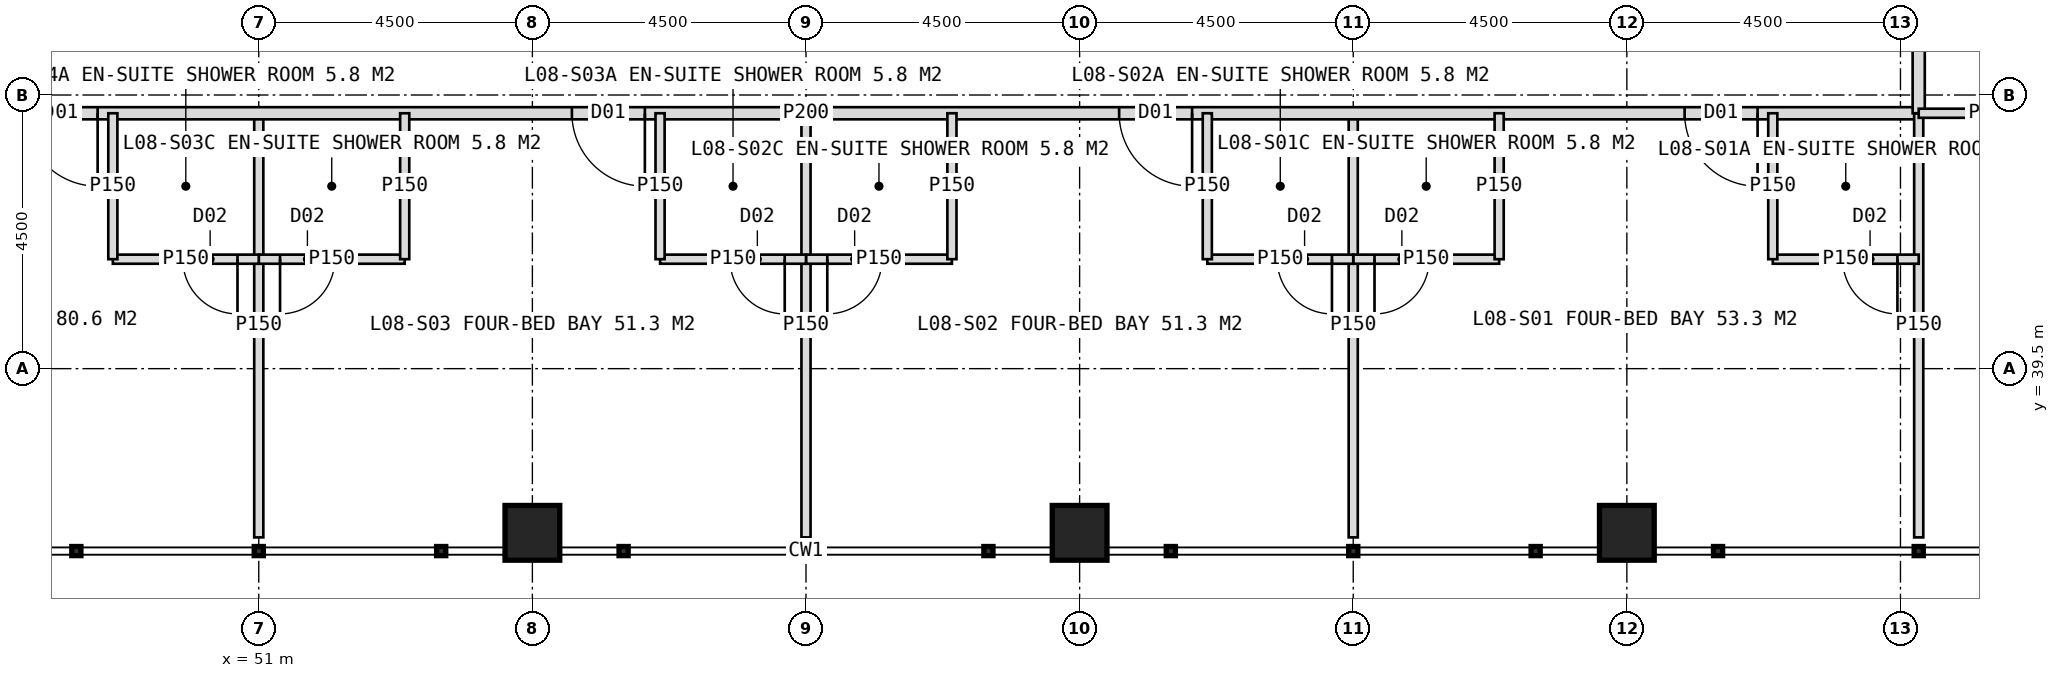
"""IFC4 building model, lengths in metres.
Left out: names, types, materials, properties, quantities, classifications, styles, units other than length and angle.
Written with IfcOpenShell. Run it as: python <this file> out.ifc"""

import sys

from ifc_helpers import new_model, si_unit, direction, frame, frame_2d, origin, origin_2d, place, context, subcontext, project, spatial, rectangle, hollow_rectangle, extrude, element, fill, save


model = new_model("IFC4")
c1 = context("Model", 3, precision=1e-05, world=origin(), true_north=direction((0.0, 1.0)))
c2 = subcontext(c1, "Body", "Model", "MODEL_VIEW")
j1 = project(units=[si_unit("LENGTHUNIT", "METRE"), si_unit("PLANEANGLEUNIT", "RADIAN")], contexts=[c1])
p1 = place(None, origin())
s1 = spatial("IfcSite", under=j1, at=p1, CompositionType="ELEMENT")
p2 = place(p1, origin())
s2 = spatial("IfcBuilding", under=s1, at=p2, CompositionType="ELEMENT")
p3 = place(p2, frame((0.0, 0.0, 39.0)))
s3 = spatial("IfcBuildingStorey", under=s2, at=p3, CompositionType="ELEMENT", Elevation=39.0)
for number, where, z_axis, x_axis in (
    (1, (55.5, 36.8, 0.0), (0.0, 0.0, 1.0), (1.0, 0.0, 0.0)),
    (2, (64.5, 36.8, 0.0), (0.0, 0.0, 1.0), (1.0, 0.0, 0.0)),
    (3, (73.5, 36.8, 0.0), (0.0, 0.0, 1.0), (1.0, 0.0, 0.0)),
):
    element("IfcColumn", number, at=place(p3, frame(where, z_axis=z_axis, x_axis=x_axis)), inside=s3, PredefinedType="COLUMN", context=c2, shape_type="SweptSolid", body=[
        extrude(hollow_rectangle(XDim=0.9, YDim=0.9, WallThickness=0.08, at=origin_2d()), origin(), (0.0, 0.0, 1.0), 4.0),
    ])
p4 = place(p3, frame((69.0, 43.7, 0.0), z_axis=(0.0, 0.0, 1.0), x_axis=(0.0, -1.0, 0.0)))
e4 = element("IfcWall", 4, at=p4, inside=s3, PredefinedType="PARTITIONING", context=c2, shape_type="SweptSolid", body=[
    extrude(rectangle(XDim=6.975, YDim=0.15, at=frame_2d((3.487, 0.0))), origin(), (0.0, 0.0, 1.0), 3.75),
])
p5 = place(p3, frame((60.0, 43.7, 0.0), z_axis=(0.0, 0.0, 1.0), x_axis=(0.0, -1.0, 0.0)))
e5 = element("IfcWall", 5, at=p5, inside=s3, PredefinedType="PARTITIONING", context=c2, shape_type="SweptSolid", body=[
    extrude(rectangle(XDim=6.975, YDim=0.15, at=frame_2d((3.487, 0.0))), origin(), (0.0, 0.0, 1.0), 2.75),
])
p6 = place(p3, frame((51.0, 43.7, 0.0), z_axis=(0.0, 0.0, 1.0), x_axis=(0.0, -1.0, 0.0)))
e6 = element("IfcWall", 6, at=p6, inside=s3, PredefinedType="PARTITIONING", context=c2, shape_type="SweptSolid", body=[
    extrude(rectangle(XDim=6.975, YDim=0.15, at=frame_2d((3.487, 0.0))), origin(), (0.0, 0.0, 1.0), 3.75),
])
p7 = place(p3, frame((78.3, 43.7, 0.0), z_axis=(0.0, 0.0, 1.0), x_axis=(-1.0, 0.0, 0.0)))
e7 = element("IfcWall", 7, at=p7, inside=s3, PredefinedType="PARTITIONING", context=c2, shape_type="SweptSolid", body=[
    extrude(rectangle(XDim=36.6, YDim=0.2, at=frame_2d((18.3, 0.0))), origin(), (0.0, 0.0, 1.0), 3.75),
])
p8 = place(p7, frame((2.65, 0.0, 0.0)))
e8 = element("IfcOpeningElement", 8, at=p8, cuts=e7, PredefinedType="OPENING", context=c2, shape_type="SweptSolid", body=[
    extrude(rectangle(XDim=1.2, YDim=2.2, at=frame_2d((0.6, 1.1))), frame((0.0, 0.11, 0.0), z_axis=(0.0, -1.0, 0.0), x_axis=(1.0, 0.0, 0.0)), (0.0, 0.0, 1.0), 0.22),
])
p9 = place(p7, frame((11.95, 0.0, 0.0)))
e9 = element("IfcOpeningElement", 9, at=p9, cuts=e7, PredefinedType="OPENING", context=c2, shape_type="SweptSolid", body=[
    extrude(rectangle(XDim=1.2, YDim=2.2, at=frame_2d((0.6, 1.1))), frame((0.0, 0.11, 0.0), z_axis=(0.0, -1.0, 0.0), x_axis=(1.0, 0.0, 0.0)), (0.0, 0.0, 1.0), 0.22),
])
p10 = place(p7, frame((20.95, 0.0, 0.0)))
e10 = element("IfcOpeningElement", 10, at=p10, cuts=e7, PredefinedType="OPENING", context=c2, shape_type="SweptSolid", body=[
    extrude(rectangle(XDim=1.2, YDim=2.2, at=frame_2d((0.6, 1.1))), frame((0.0, 0.11, 0.0), z_axis=(0.0, -1.0, 0.0), x_axis=(1.0, 0.0, 0.0)), (0.0, 0.0, 1.0), 0.22),
])
p11 = place(p7, frame((29.95, 0.0, 0.0)))
e11 = element("IfcOpeningElement", 11, at=p11, cuts=e7, PredefinedType="OPENING", context=c2, shape_type="SweptSolid", body=[
    extrude(rectangle(XDim=1.2, YDim=2.2, at=frame_2d((0.6, 1.1))), frame((0.0, 0.11, 0.0), z_axis=(0.0, -1.0, 0.0), x_axis=(1.0, 0.0, 0.0)), (0.0, 0.0, 1.0), 0.22),
])
p12 = place(p3, frame((78.3, 43.7, 0.0), z_axis=(0.0, 0.0, 1.0), x_axis=(0.0, -1.0, 0.0)))
e12 = element("IfcWall", 12, at=p12, inside=s3, PredefinedType="PARTITIONING", context=c2, shape_type="SweptSolid", body=[
    extrude(rectangle(XDim=6.975, YDim=0.15, at=frame_2d((3.487, 0.0))), origin(), (0.0, 0.0, 1.0), 3.75),
])
p13 = place(p3, frame((78.3, 41.3, 0.0), z_axis=(0.0, 0.0, 1.0), x_axis=(-1.0, 0.0, 0.0)))
e13 = element("IfcWall", 13, at=p13, inside=s3, PredefinedType="PARTITIONING", context=c2, shape_type="SweptSolid", body=[
    extrude(rectangle(XDim=2.4, YDim=0.15, at=frame_2d((1.2, 0.0))), origin(), (0.0, 0.0, 1.0), 2.95),
])
p14 = place(p13, frame((0.35, 0.0, 0.0)))
e14 = element("IfcOpeningElement", 14, at=p14, cuts=e13, PredefinedType="OPENING", context=c2, shape_type="SweptSolid", body=[
    extrude(rectangle(XDim=0.9, YDim=2.1, at=frame_2d((0.45, 1.05))), frame((0.0, 0.085, 0.0), z_axis=(0.0, -1.0, 0.0), x_axis=(1.0, 0.0, 0.0)), (0.0, 0.0, 1.0), 0.17),
])
p15 = place(p3, frame((75.9, 43.7, 0.0), z_axis=(0.0, 0.0, 1.0), x_axis=(0.0, -1.0, 0.0)))
e15 = element("IfcWall", 15, at=p15, inside=s3, PredefinedType="PARTITIONING", context=c2, shape_type="SweptSolid", body=[
    extrude(rectangle(XDim=2.4, YDim=0.15, at=frame_2d((1.2, 0.0))), origin(), (0.0, 0.0, 1.0), 3.75),
])
p16 = place(p3, frame((71.4, 41.3, 0.0), z_axis=(0.0, 0.0, 1.0), x_axis=(-1.0, 0.0, 0.0)))
e16 = element("IfcWall", 16, at=p16, inside=s3, PredefinedType="PARTITIONING", context=c2, shape_type="SweptSolid", body=[
    extrude(rectangle(XDim=2.4, YDim=0.15, at=frame_2d((1.2, 0.0))), origin(), (0.0, 0.0, 1.0), 3.75),
])
p17 = place(p16, frame((1.15, 0.0, 0.0)))
e17 = element("IfcOpeningElement", 17, at=p17, cuts=e16, PredefinedType="OPENING", context=c2, shape_type="SweptSolid", body=[
    extrude(rectangle(XDim=0.9, YDim=2.1, at=frame_2d((0.45, 1.05))), frame((0.0, 0.085, 0.0), z_axis=(0.0, -1.0, 0.0), x_axis=(1.0, 0.0, 0.0)), (0.0, 0.0, 1.0), 0.17),
])
p18 = place(p3, frame((71.4, 43.7, 0.0), z_axis=(0.0, 0.0, 1.0), x_axis=(0.0, -1.0, 0.0)))
e18 = element("IfcWall", 18, at=p18, inside=s3, PredefinedType="PARTITIONING", context=c2, shape_type="SweptSolid", body=[
    extrude(rectangle(XDim=2.4, YDim=0.15, at=frame_2d((1.2, 0.0))), origin(), (0.0, 0.0, 1.0), 3.75),
])
p19 = place(p3, frame((69.0, 41.3, 0.0), z_axis=(0.0, 0.0, 1.0), x_axis=(-1.0, 0.0, 0.0)))
e19 = element("IfcWall", 19, at=p19, inside=s3, PredefinedType="PARTITIONING", context=c2, shape_type="SweptSolid", body=[
    extrude(rectangle(XDim=2.4, YDim=0.15, at=frame_2d((1.2, 0.0))), origin(), (0.0, 0.0, 1.0), 3.75),
])
p20 = place(p19, frame((0.35, 0.0, 0.0)))
e20 = element("IfcOpeningElement", 20, at=p20, cuts=e19, PredefinedType="OPENING", context=c2, shape_type="SweptSolid", body=[
    extrude(rectangle(XDim=0.9, YDim=2.1, at=frame_2d((0.45, 1.05))), frame((0.0, 0.085, 0.0), z_axis=(0.0, -1.0, 0.0), x_axis=(1.0, 0.0, 0.0)), (0.0, 0.0, 1.0), 0.17),
])
p21 = place(p3, frame((66.6, 43.7, 0.0), z_axis=(0.0, 0.0, 1.0), x_axis=(0.0, -1.0, 0.0)))
e21 = element("IfcWall", 21, at=p21, inside=s3, PredefinedType="PARTITIONING", context=c2, shape_type="SweptSolid", body=[
    extrude(rectangle(XDim=2.4, YDim=0.15, at=frame_2d((1.2, 0.0))), origin(), (0.0, 0.0, 1.0), 3.75),
])
p22 = place(p3, frame((62.4, 41.3, 0.0), z_axis=(0.0, 0.0, 1.0), x_axis=(-1.0, 0.0, 0.0)))
e22 = element("IfcWall", 22, at=p22, inside=s3, PredefinedType="PARTITIONING", context=c2, shape_type="SweptSolid", body=[
    extrude(rectangle(XDim=2.4, YDim=0.15, at=frame_2d((1.2, 0.0))), origin(), (0.0, 0.0, 1.0), 3.75),
])
p23 = place(p22, frame((1.15, 0.0, 0.0)))
e23 = element("IfcOpeningElement", 23, at=p23, cuts=e22, PredefinedType="OPENING", context=c2, shape_type="SweptSolid", body=[
    extrude(rectangle(XDim=0.9, YDim=2.1, at=frame_2d((0.45, 1.05))), frame((0.0, 0.085, 0.0), z_axis=(0.0, -1.0, 0.0), x_axis=(1.0, 0.0, 0.0)), (0.0, 0.0, 1.0), 0.17),
])
p24 = place(p3, frame((62.4, 43.7, 0.0), z_axis=(0.0, 0.0, 1.0), x_axis=(0.0, -1.0, 0.0)))
e24 = element("IfcWall", 24, at=p24, inside=s3, PredefinedType="PARTITIONING", context=c2, shape_type="SweptSolid", body=[
    extrude(rectangle(XDim=2.4, YDim=0.15, at=frame_2d((1.2, 0.0))), origin(), (0.0, 0.0, 1.0), 3.75),
])
p25 = place(p3, frame((60.0, 41.3, 0.0), z_axis=(0.0, 0.0, 1.0), x_axis=(-1.0, 0.0, 0.0)))
e25 = element("IfcWall", 25, at=p25, inside=s3, PredefinedType="PARTITIONING", context=c2, shape_type="SweptSolid", body=[
    extrude(rectangle(XDim=2.4, YDim=0.15, at=frame_2d((1.2, 0.0))), origin(), (0.0, 0.0, 1.0), 3.75),
])
p26 = place(p25, frame((0.35, 0.0, 0.0)))
e26 = element("IfcOpeningElement", 26, at=p26, cuts=e25, PredefinedType="OPENING", context=c2, shape_type="SweptSolid", body=[
    extrude(rectangle(XDim=0.9, YDim=2.1, at=frame_2d((0.45, 1.05))), frame((0.0, 0.085, 0.0), z_axis=(0.0, -1.0, 0.0), x_axis=(1.0, 0.0, 0.0)), (0.0, 0.0, 1.0), 0.17),
])
p27 = place(p3, frame((57.6, 43.7, 0.0), z_axis=(0.0, 0.0, 1.0), x_axis=(0.0, -1.0, 0.0)))
e27 = element("IfcWall", 27, at=p27, inside=s3, PredefinedType="PARTITIONING", context=c2, shape_type="SweptSolid", body=[
    extrude(rectangle(XDim=2.4, YDim=0.15, at=frame_2d((1.2, 0.0))), origin(), (0.0, 0.0, 1.0), 3.75),
])
p28 = place(p3, frame((53.4, 41.3, 0.0), z_axis=(0.0, 0.0, 1.0), x_axis=(-1.0, 0.0, 0.0)))
e28 = element("IfcWall", 28, at=p28, inside=s3, PredefinedType="PARTITIONING", context=c2, shape_type="SweptSolid", body=[
    extrude(rectangle(XDim=2.4, YDim=0.15, at=frame_2d((1.2, 0.0))), origin(), (0.0, 0.0, 1.0), 3.75),
])
p29 = place(p28, frame((1.15, 0.0, 0.0)))
e29 = element("IfcOpeningElement", 29, at=p29, cuts=e28, PredefinedType="OPENING", context=c2, shape_type="SweptSolid", body=[
    extrude(rectangle(XDim=0.9, YDim=2.1, at=frame_2d((0.45, 1.05))), frame((0.0, 0.085, 0.0), z_axis=(0.0, -1.0, 0.0), x_axis=(1.0, 0.0, 0.0)), (0.0, 0.0, 1.0), 0.17),
])
p30 = place(p3, frame((53.4, 43.7, 0.0), z_axis=(0.0, 0.0, 1.0), x_axis=(0.0, -1.0, 0.0)))
e30 = element("IfcWall", 30, at=p30, inside=s3, PredefinedType="PARTITIONING", context=c2, shape_type="SweptSolid", body=[
    extrude(rectangle(XDim=2.4, YDim=0.15, at=frame_2d((1.2, 0.0))), origin(), (0.0, 0.0, 1.0), 3.75),
])
p31 = place(p3, frame((51.0, 41.3, 0.0), z_axis=(0.0, 0.0, 1.0), x_axis=(-1.0, 0.0, 0.0)))
e31 = element("IfcWall", 31, at=p31, inside=s3, PredefinedType="PARTITIONING", context=c2, shape_type="SweptSolid", body=[
    extrude(rectangle(XDim=2.4, YDim=0.15, at=frame_2d((1.2, 0.0))), origin(), (0.0, 0.0, 1.0), 3.75),
])
p32 = place(p31, frame((0.35, 0.0, 0.0)))
e32 = element("IfcOpeningElement", 32, at=p32, cuts=e31, PredefinedType="OPENING", context=c2, shape_type="SweptSolid", body=[
    extrude(rectangle(XDim=0.9, YDim=2.1, at=frame_2d((0.45, 1.05))), frame((0.0, 0.085, 0.0), z_axis=(0.0, -1.0, 0.0), x_axis=(1.0, 0.0, 0.0)), (0.0, 0.0, 1.0), 0.17),
])
p33 = place(p3, frame((48.6, 43.7, 0.0), z_axis=(0.0, 0.0, 1.0), x_axis=(0.0, -1.0, 0.0)))
e33 = element("IfcWall", 33, at=p33, inside=s3, PredefinedType="PARTITIONING", context=c2, shape_type="SweptSolid", body=[
    extrude(rectangle(XDim=2.4, YDim=0.15, at=frame_2d((1.2, 0.0))), origin(), (0.0, 0.0, 1.0), 3.75),
])
p34 = place(p3, frame((78.3, 80.3, 0.0), z_axis=(0.0, 0.0, 1.0), x_axis=(0.0, -1.0, 0.0)))
e34 = element("IfcWall", 34, at=p34, inside=s3, PredefinedType="PARTITIONING", context=c2, shape_type="SweptSolid", body=[
    extrude(rectangle(XDim=36.6, YDim=0.2, at=frame_2d((18.3, 0.0))), origin(), (0.0, 0.0, 1.0), 3.75),
])
p35 = place(p34, frame((2.65, 0.0, 0.0)))
e35 = element("IfcOpeningElement", 35, at=p35, cuts=e34, PredefinedType="OPENING", context=c2, shape_type="SweptSolid", body=[
    extrude(rectangle(XDim=1.2, YDim=2.2, at=frame_2d((0.6, 1.1))), frame((0.0, 0.11, 0.0), z_axis=(0.0, -1.0, 0.0), x_axis=(1.0, 0.0, 0.0)), (0.0, 0.0, 1.0), 0.22),
])
p36 = place(p34, frame((11.95, 0.0, 0.0)))
e36 = element("IfcOpeningElement", 36, at=p36, cuts=e34, PredefinedType="OPENING", context=c2, shape_type="SweptSolid", body=[
    extrude(rectangle(XDim=1.2, YDim=2.2, at=frame_2d((0.6, 1.1))), frame((0.0, 0.11, 0.0), z_axis=(0.0, -1.0, 0.0), x_axis=(1.0, 0.0, 0.0)), (0.0, 0.0, 1.0), 0.22),
])
p37 = place(p34, frame((20.95, 0.0, 0.0)))
e37 = element("IfcOpeningElement", 37, at=p37, cuts=e34, PredefinedType="OPENING", context=c2, shape_type="SweptSolid", body=[
    extrude(rectangle(XDim=1.2, YDim=2.2, at=frame_2d((0.6, 1.1))), frame((0.0, 0.11, 0.0), z_axis=(0.0, -1.0, 0.0), x_axis=(1.0, 0.0, 0.0)), (0.0, 0.0, 1.0), 0.22),
])
p38 = place(p34, frame((29.95, 0.0, 0.0)))
e38 = element("IfcOpeningElement", 38, at=p38, cuts=e34, PredefinedType="OPENING", context=c2, shape_type="SweptSolid", body=[
    extrude(rectangle(XDim=1.2, YDim=2.2, at=frame_2d((0.6, 1.1))), frame((0.0, 0.11, 0.0), z_axis=(0.0, -1.0, 0.0), x_axis=(1.0, 0.0, 0.0)), (0.0, 0.0, 1.0), 0.22),
])
p39 = place(p3, frame((78.3, 43.7, 0.0), z_axis=(0.0, 0.0, 1.0), x_axis=(1.0, 0.0, 0.0)))
e39 = element("IfcWall", 39, at=p39, inside=s3, PredefinedType="PARTITIONING", context=c2, shape_type="SweptSolid", body=[
    extrude(rectangle(XDim=2.4, YDim=0.15, at=frame_2d((1.2, 0.0))), origin(), (0.0, 0.0, 1.0), 3.75),
])
p40 = place(p8, origin())
e40 = element("IfcDoor", 40, at=p40, inside=s3, OperationType="SINGLE_SWING_LEFT", PredefinedType="DOOR", context=c2, shape_type="SweptSolid", body=[
    extrude(rectangle(XDim=1.2, YDim=2.2, at=frame_2d((0.6, 1.1))), frame((0.0, 0.025, 0.0), z_axis=(0.0, -1.0, 0.0), x_axis=(1.0, 0.0, 0.0)), (0.0, 0.0, 1.0), 0.05),
])
fill(e8, e40)
p41 = place(p14, origin())
e41 = element("IfcDoor", 41, at=p41, inside=s3, OperationType="SINGLE_SWING_LEFT", PredefinedType="DOOR", context=c2, shape_type="SweptSolid", body=[
    extrude(rectangle(XDim=0.9, YDim=2.1, at=frame_2d((0.45, 1.05))), frame((0.0, 0.025, 0.0), z_axis=(0.0, -1.0, 0.0), x_axis=(1.0, 0.0, 0.0)), (0.0, 0.0, 1.0), 0.05),
])
fill(e14, e41)
p42 = place(p17, origin())
e42 = element("IfcDoor", 42, at=p42, inside=s3, OperationType="SINGLE_SWING_RIGHT", PredefinedType="DOOR", context=c2, shape_type="SweptSolid", body=[
    extrude(rectangle(XDim=0.9, YDim=2.1, at=frame_2d((0.45, 1.05))), frame((0.0, 0.025, 0.0), z_axis=(0.0, -1.0, 0.0), x_axis=(1.0, 0.0, 0.0)), (0.0, 0.0, 1.0), 0.05),
])
fill(e17, e42)
p43 = place(p9, origin())
e43 = element("IfcDoor", 43, at=p43, inside=s3, OperationType="SINGLE_SWING_LEFT", PredefinedType="DOOR", context=c2, shape_type="SweptSolid", body=[
    extrude(rectangle(XDim=1.2, YDim=2.2, at=frame_2d((0.6, 1.1))), frame((0.0, 0.025, 0.0), z_axis=(0.0, -1.0, 0.0), x_axis=(1.0, 0.0, 0.0)), (0.0, 0.0, 1.0), 0.05),
])
fill(e9, e43)
p44 = place(p20, origin())
e44 = element("IfcDoor", 44, at=p44, inside=s3, OperationType="SINGLE_SWING_LEFT", PredefinedType="DOOR", context=c2, shape_type="SweptSolid", body=[
    extrude(rectangle(XDim=0.9, YDim=2.1, at=frame_2d((0.45, 1.05))), frame((0.0, 0.025, 0.0), z_axis=(0.0, -1.0, 0.0), x_axis=(1.0, 0.0, 0.0)), (0.0, 0.0, 1.0), 0.05),
])
fill(e20, e44)
p45 = place(p23, origin())
e45 = element("IfcDoor", 45, at=p45, inside=s3, OperationType="SINGLE_SWING_RIGHT", PredefinedType="DOOR", context=c2, shape_type="SweptSolid", body=[
    extrude(rectangle(XDim=0.9, YDim=2.1, at=frame_2d((0.45, 1.05))), frame((0.0, 0.025, 0.0), z_axis=(0.0, -1.0, 0.0), x_axis=(1.0, 0.0, 0.0)), (0.0, 0.0, 1.0), 0.05),
])
fill(e23, e45)
p46 = place(p10, origin())
e46 = element("IfcDoor", 46, at=p46, inside=s3, OperationType="SINGLE_SWING_LEFT", PredefinedType="DOOR", context=c2, shape_type="SweptSolid", body=[
    extrude(rectangle(XDim=1.2, YDim=2.2, at=frame_2d((0.6, 1.1))), frame((0.0, 0.025, 0.0), z_axis=(0.0, -1.0, 0.0), x_axis=(1.0, 0.0, 0.0)), (0.0, 0.0, 1.0), 0.05),
])
fill(e10, e46)
p47 = place(p26, origin())
e47 = element("IfcDoor", 47, at=p47, inside=s3, OperationType="SINGLE_SWING_LEFT", PredefinedType="DOOR", context=c2, shape_type="SweptSolid", body=[
    extrude(rectangle(XDim=0.9, YDim=2.1, at=frame_2d((0.45, 1.05))), frame((0.0, 0.025, 0.0), z_axis=(0.0, -1.0, 0.0), x_axis=(1.0, 0.0, 0.0)), (0.0, 0.0, 1.0), 0.05),
])
fill(e26, e47)
p48 = place(p29, origin())
e48 = element("IfcDoor", 48, at=p48, inside=s3, OperationType="SINGLE_SWING_RIGHT", PredefinedType="DOOR", context=c2, shape_type="SweptSolid", body=[
    extrude(rectangle(XDim=0.9, YDim=2.1, at=frame_2d((0.45, 1.05))), frame((0.0, 0.025, 0.0), z_axis=(0.0, -1.0, 0.0), x_axis=(1.0, 0.0, 0.0)), (0.0, 0.0, 1.0), 0.05),
])
fill(e29, e48)
p49 = place(p11, origin())
e49 = element("IfcDoor", 49, at=p49, inside=s3, OperationType="SINGLE_SWING_LEFT", PredefinedType="DOOR", context=c2, shape_type="SweptSolid", body=[
    extrude(rectangle(XDim=1.2, YDim=2.2, at=frame_2d((0.6, 1.1))), frame((0.0, 0.025, 0.0), z_axis=(0.0, -1.0, 0.0), x_axis=(1.0, 0.0, 0.0)), (0.0, 0.0, 1.0), 0.05),
])
fill(e11, e49)
p50 = place(p32, origin())
e50 = element("IfcDoor", 50, at=p50, inside=s3, OperationType="SINGLE_SWING_LEFT", PredefinedType="DOOR", context=c2, shape_type="SweptSolid", body=[
    extrude(rectangle(XDim=0.9, YDim=2.1, at=frame_2d((0.45, 1.05))), frame((0.0, 0.025, 0.0), z_axis=(0.0, -1.0, 0.0), x_axis=(1.0, 0.0, 0.0)), (0.0, 0.0, 1.0), 0.05),
])
fill(e32, e50)
save(model, sys.argv[1])
